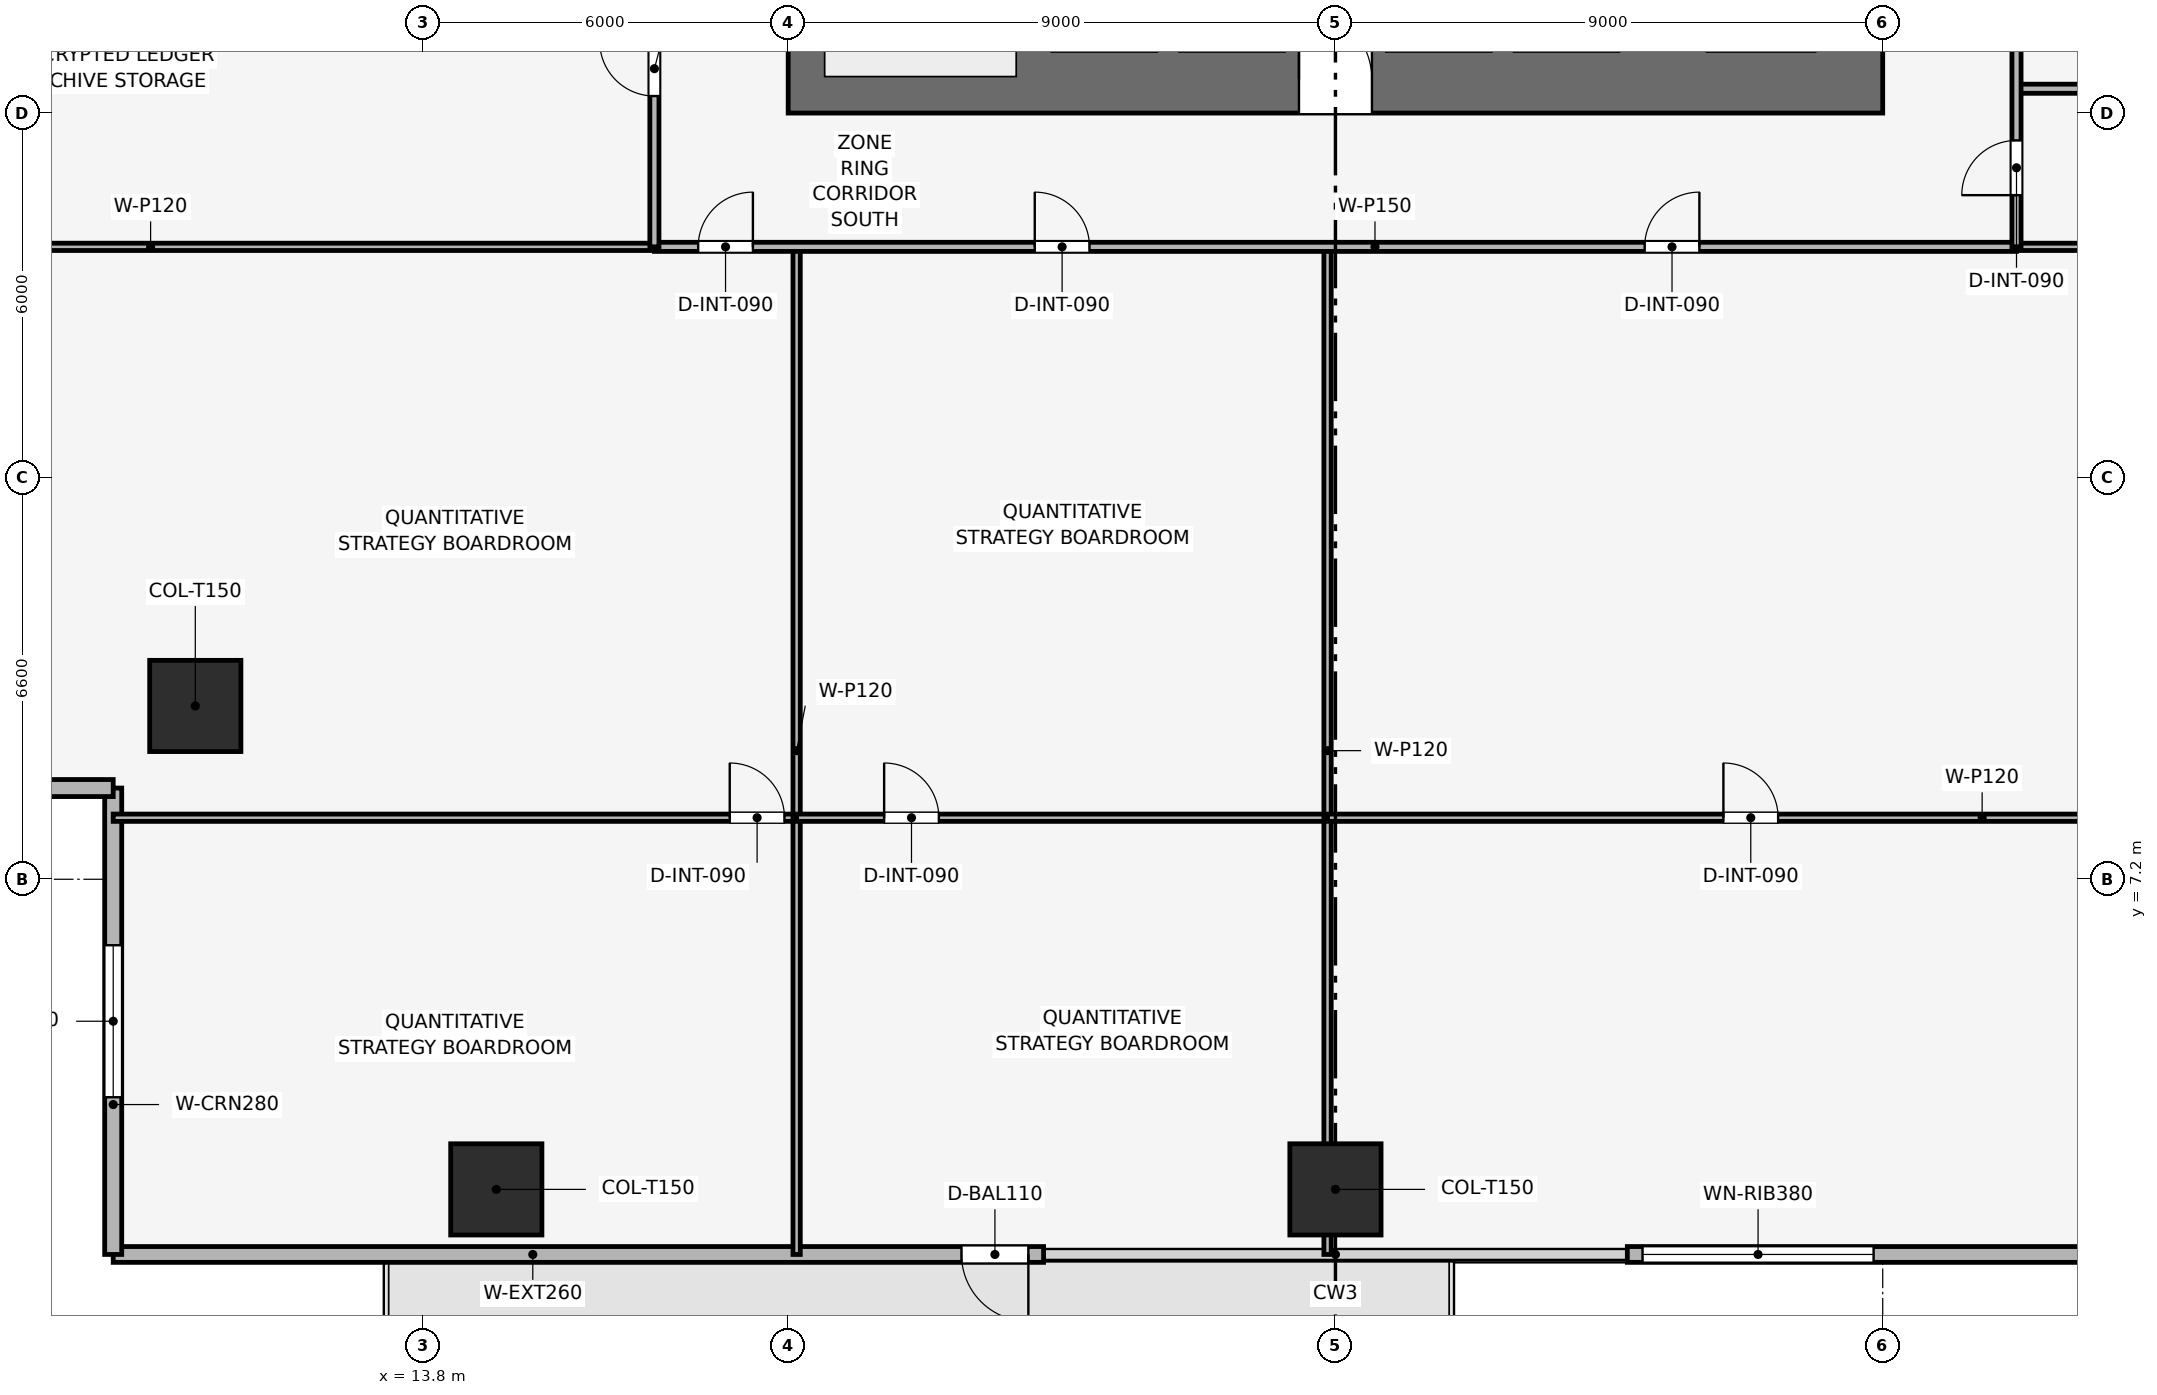
"""IFC4 building model, lengths in metres.
Left out: names, types, materials, properties, quantities, classifications, styles, units other than length and angle.
Written with IfcOpenShell. Run it as: python <this file> out.ifc"""

import sys

from ifc_helpers import new_model, si_unit, direction, frame, frame_2d, origin, origin_2d, place, context, subcontext, project, spatial, rectangle, extrude, element, fill, save


model = new_model("IFC4")
c1 = context("Model", 3, precision=1e-05, world=origin(), true_north=direction((0.0, 1.0)))
c2 = subcontext(c1, "Body", "Model", "MODEL_VIEW")
j1 = project(units=[si_unit("LENGTHUNIT", "METRE"), si_unit("PLANEANGLEUNIT", "RADIAN")], contexts=[c1])
p1 = place(None, origin())
s1 = spatial("IfcSite", under=j1, at=p1, CompositionType="ELEMENT")
p2 = place(p1, origin())
s2 = spatial("IfcBuilding", under=s1, at=p2, CompositionType="ELEMENT")
p3 = place(p2, frame((0.0, 0.0, 88.5)))
s3 = spatial("IfcBuildingStorey", under=s2, at=p3, CompositionType="ELEMENT", Elevation=88.5)
p4 = place(p3, frame((19.8, 20.35, 0.0), z_axis=(0.0, 0.0, 1.0), x_axis=(1.0, 0.0, 0.0)))
e1 = element("IfcWall", 1, at=p4, inside=s3, PredefinedType="SHEAR", context=c2, shape_type="SweptSolid", body=[
    extrude(rectangle(XDim=18.0, YDim=1.1, at=frame_2d((9.0, 0.0))), origin(), (0.0, 0.0, 1.0), 3.9),
])
p5 = place(p4, frame((8.4, 0.0, 0.0)))
e2 = element("IfcOpeningElement", 2, at=p5, cuts=e1, PredefinedType="OPENING", context=c2, shape_type="SweptSolid", body=[
    extrude(rectangle(XDim=1.2, YDim=2.2, at=frame_2d((0.6, 1.1))), frame((0.0, 0.56, 0.0), z_axis=(0.0, -1.0, 0.0), x_axis=(1.0, 0.0, 0.0)), (0.0, 0.0, 1.0), 1.12),
])
for number, where, z_axis, x_axis in (
    (3, (15.0, 2.1, 0.003), (0.0, 0.0, 1.0), (1.0, 0.0, 0.0)),
    (4, (28.8, 2.1, 0.003), (0.0, 0.0, 1.0), (1.0, 0.0, 0.0)),
    (5, (10.05, 10.05, 0.003), (0.0, 0.0, 1.0), (1.0, 0.0, 0.0)),
):
    element("IfcColumn", number, at=place(p3, frame(where, z_axis=z_axis, x_axis=x_axis)), inside=s3, PredefinedType="COLUMN", context=c2, shape_type="SweptSolid", body=[
        extrude(rectangle(XDim=1.5, YDim=1.5, at=origin_2d()), origin(), (0.0, 0.0, 1.0), 3.644),
    ])
p6 = place(p3, frame((48.9, 1.03, 0.0), z_axis=(0.0, 0.0, 1.0), x_axis=(-1.0, 0.0, 0.0)))
e6 = element("IfcWall", 6, at=p6, inside=s3, PredefinedType="SOLIDWALL", context=c2, shape_type="SweptSolid", body=[
    extrude(rectangle(XDim=15.3, YDim=0.26, at=frame_2d((7.65, 0.0))), origin(), (0.0, 0.0, 1.0), 3.65),
])
p7 = place(p6, frame((11.25, 0.0, 0.9)))
e7 = element("IfcOpeningElement", 7, at=p7, cuts=e6, PredefinedType="OPENING", context=c2, shape_type="SweptSolid", body=[
    extrude(rectangle(XDim=3.8, YDim=1.9, at=frame_2d((1.9, 0.95))), frame((0.0, 0.14, 0.0), z_axis=(0.0, -1.0, 0.0), x_axis=(1.0, 0.0, 0.0)), (0.0, 0.0, 1.0), 0.28),
])
p8 = place(p3, frame((24.0, 1.03, 0.0), z_axis=(0.0, 0.0, 1.0), x_axis=(-1.0, 0.0, 0.0)))
e8 = element("IfcWall", 8, at=p8, inside=s3, PredefinedType="SOLIDWALL", context=c2, shape_type="SweptSolid", body=[
    extrude(rectangle(XDim=15.3, YDim=0.26, at=frame_2d((7.65, 0.0))), origin(), (0.0, 0.0, 1.0), 3.65),
])
p9 = place(p8, frame((0.25, 0.0, 0.0)))
e9 = element("IfcOpeningElement", 9, at=p9, cuts=e8, PredefinedType="OPENING", context=c2, shape_type="SweptSolid", body=[
    extrude(rectangle(XDim=1.1, YDim=2.2, at=frame_2d((0.55, 1.1))), frame((0.0, 0.14, 0.0), z_axis=(0.0, -1.0, 0.0), x_axis=(1.0, 0.0, 0.0)), (0.0, 0.0, 1.0), 0.28),
])
p10 = place(p3, frame((8.7, 1.03, 0.0), z_axis=(0.0, 0.0, 1.0), x_axis=(0.0, 1.0, 0.0)))
e10 = element("IfcWall", 10, at=p10, inside=s3, PredefinedType="SOLIDWALL", context=c2, shape_type="SweptSolid", body=[
    extrude(rectangle(XDim=7.67, YDim=0.28, at=frame_2d((3.835, 0.0))), origin(), (0.0, 0.0, 1.0), 3.65),
])
p11 = place(p10, frame((2.585, 0.0, 0.9)))
e11 = element("IfcOpeningElement", 11, at=p11, cuts=e10, PredefinedType="OPENING", context=c2, shape_type="SweptSolid", body=[
    extrude(rectangle(XDim=2.5, YDim=1.9, at=frame_2d((1.25, 0.95))), frame((0.0, 0.15, 0.0), z_axis=(0.0, -1.0, 0.0), x_axis=(1.0, 0.0, 0.0)), (0.0, 0.0, 1.0), 0.3),
])
p12 = place(p3, frame((8.7, 8.7, 0.0), z_axis=(0.0, 0.0, 1.0), x_axis=(-1.0, 0.0, 0.0)))
e12 = element("IfcWall", 12, at=p12, inside=s3, PredefinedType="SOLIDWALL", context=c2, shape_type="SweptSolid", body=[
    extrude(rectangle(XDim=7.67, YDim=0.28, at=frame_2d((3.835, 0.0))), origin(), (0.0, 0.0, 1.0), 3.65),
])
p13 = place(p12, frame((2.585, 0.0, 0.9)))
e13 = element("IfcOpeningElement", 13, at=p13, cuts=e12, PredefinedType="OPENING", context=c2, shape_type="SweptSolid", body=[
    extrude(rectangle(XDim=2.5, YDim=1.9, at=frame_2d((1.25, 0.95))), frame((0.0, 0.15, 0.0), z_axis=(0.0, -1.0, 0.0), x_axis=(1.0, 0.0, 0.0)), (0.0, 0.0, 1.0), 0.3),
])
p14 = place(p3, frame((8.7, 8.212, 0.0), z_axis=(0.0, 0.0, 1.0), x_axis=(1.0, 0.0, 0.0)))
e14 = element("IfcWall", 14, at=p14, inside=s3, PredefinedType="PARTITIONING", context=c2, shape_type="SweptSolid", body=[
    extrude(rectangle(XDim=11.239, YDim=0.12, at=frame_2d((5.62, 0.0))), origin(), (0.0, 0.0, 1.0), 2.935),
])
p15 = place(p14, frame((10.139, 0.0, 0.0)))
e15 = element("IfcOpeningElement", 15, at=p15, cuts=e14, PredefinedType="OPENING", context=c2, shape_type="SweptSolid", body=[
    extrude(rectangle(XDim=0.9, YDim=2.1, at=frame_2d((0.45, 1.05))), frame((0.0, 0.07, 0.0), z_axis=(0.0, -1.0, 0.0), x_axis=(1.0, 0.0, 0.0)), (0.0, 0.0, 1.0), 0.14),
])
p16 = place(p3, frame((19.939, 1.03, 0.0), z_axis=(0.0, 0.0, 1.0), x_axis=(0.0, 1.0, 0.0)))
e16 = element("IfcWall", 16, at=p16, inside=s3, PredefinedType="PARTITIONING", context=c2, shape_type="SweptSolid", body=[
    extrude(rectangle(XDim=16.57, YDim=0.12, at=frame_2d((8.285, 0.0))), origin(), (0.0, 0.0, 1.0), 2.935),
])
p17 = place(p3, frame((19.939, 8.212, 0.0), z_axis=(0.0, 0.0, 1.0), x_axis=(1.0, 0.0, 0.0)))
e17 = element("IfcWall", 17, at=p17, inside=s3, PredefinedType="PARTITIONING", context=c2, shape_type="SweptSolid", body=[
    extrude(rectangle(XDim=8.731, YDim=0.12, at=frame_2d((4.365, 0.0))), origin(), (0.0, 0.0, 1.0), 3.085),
])
p18 = place(p17, frame((1.439, 0.0, 0.0)))
e18 = element("IfcOpeningElement", 18, at=p18, cuts=e17, PredefinedType="OPENING", context=c2, shape_type="SweptSolid", body=[
    extrude(rectangle(XDim=0.9, YDim=2.1, at=frame_2d((0.45, 1.05))), frame((0.0, 0.07, 0.0), z_axis=(0.0, -1.0, 0.0), x_axis=(1.0, 0.0, 0.0)), (0.0, 0.0, 1.0), 0.14),
])
p19 = place(p3, frame((28.67, 1.03, 0.0), z_axis=(0.0, 0.0, 1.0), x_axis=(0.0, 1.0, 0.0)))
e19 = element("IfcWall", 19, at=p19, inside=s3, PredefinedType="PARTITIONING", context=c2, shape_type="SweptSolid", body=[
    extrude(rectangle(XDim=16.57, YDim=0.12, at=frame_2d((8.285, 0.0))), origin(), (0.0, 0.0, 1.0), 3.085),
])
p20 = place(p3, frame((28.67, 8.212, 0.0), z_axis=(0.0, 0.0, 1.0), x_axis=(1.0, 0.0, 0.0)))
e20 = element("IfcWall", 20, at=p20, inside=s3, PredefinedType="PARTITIONING", context=c2, shape_type="SweptSolid", body=[
    extrude(rectangle(XDim=20.23, YDim=0.12, at=frame_2d((10.115, 0.0))), origin(), (0.0, 0.0, 1.0), 2.935),
])
p21 = place(p20, frame((6.51, 0.0, 0.0)))
e21 = element("IfcOpeningElement", 21, at=p21, cuts=e20, PredefinedType="OPENING", context=c2, shape_type="SweptSolid", body=[
    extrude(rectangle(XDim=0.9, YDim=2.1, at=frame_2d((0.45, 1.05))), frame((0.0, 0.07, 0.0), z_axis=(0.0, -1.0, 0.0), x_axis=(1.0, 0.0, 0.0)), (0.0, 0.0, 1.0), 0.14),
])
for number, where, z_axis, x_axis in (
    (22, (1.03, 17.6, 0.0), (0.0, 0.0, 1.0), (1.0, 0.0, 0.0)),
    (23, (40.0, 17.6, 0.0), (0.0, 0.0, 1.0), (1.0, 0.0, 0.0)),
):
    element("IfcWall", number, at=place(p3, frame(where, z_axis=z_axis, x_axis=x_axis)), inside=s3, PredefinedType="PARTITIONING", context=c2, shape_type="SweptSolid", body=[
        extrude(rectangle(XDim=16.57, YDim=0.12, at=frame_2d((8.285, 0.0))), origin(), (0.0, 0.0, 1.0), 2.935),
    ])
p22 = place(p3, frame((40.0, 20.2, 0.0), z_axis=(0.0, 0.0, 1.0), x_axis=(1.0, 0.0, 0.0)))
e24 = element("IfcWall", 24, at=p22, inside=s3, PredefinedType="PARTITIONING", context=c2, shape_type="SweptSolid", body=[
    extrude(rectangle(XDim=16.57, YDim=0.15, at=frame_2d((8.285, 0.0))), origin(), (0.0, 0.0, 1.0), 2.935),
])
p23 = place(p22, frame((9.435, 0.0, 0.0)))
e25 = element("IfcOpeningElement", 25, at=p23, cuts=e24, PredefinedType="OPENING", context=c2, shape_type="SweptSolid", body=[
    extrude(rectangle(XDim=0.9, YDim=2.1, at=frame_2d((0.45, 1.05))), frame((0.0, 0.085, 0.0), z_axis=(0.0, -1.0, 0.0), x_axis=(1.0, 0.0, 0.0)), (0.0, 0.0, 1.0), 0.17),
])
p24 = place(p3, frame((17.6, 17.6, 0.0), z_axis=(0.0, 0.0, 1.0), x_axis=(1.0, 0.0, 0.0)))
e26 = element("IfcWall", 26, at=p24, inside=s3, PredefinedType="PARTITIONING", context=c2, shape_type="SweptSolid", body=[
    extrude(rectangle(XDim=22.4, YDim=0.15, at=frame_2d((11.2, 0.0))), origin(), (0.0, 0.0, 1.0), 3.085),
])
p25 = place(p24, frame((0.72, 0.0, 0.0)))
e27 = element("IfcOpeningElement", 27, at=p25, cuts=e26, PredefinedType="OPENING", context=c2, shape_type="SweptSolid", body=[
    extrude(rectangle(XDim=0.9, YDim=2.1, at=frame_2d((0.45, 1.05))), frame((0.0, 0.085, 0.0), z_axis=(0.0, -1.0, 0.0), x_axis=(1.0, 0.0, 0.0)), (0.0, 0.0, 1.0), 0.17),
])
p26 = place(p24, frame((6.255, 0.0, 0.0)))
e28 = element("IfcOpeningElement", 28, at=p26, cuts=e26, PredefinedType="OPENING", context=c2, shape_type="SweptSolid", body=[
    extrude(rectangle(XDim=0.9, YDim=2.1, at=frame_2d((0.45, 1.05))), frame((0.0, 0.085, 0.0), z_axis=(0.0, -1.0, 0.0), x_axis=(1.0, 0.0, 0.0)), (0.0, 0.0, 1.0), 0.17),
])
p27 = place(p24, frame((16.285, 0.0, 0.0)))
e29 = element("IfcOpeningElement", 29, at=p27, cuts=e26, PredefinedType="OPENING", context=c2, shape_type="SweptSolid", body=[
    extrude(rectangle(XDim=0.9, YDim=2.1, at=frame_2d((0.45, 1.05))), frame((0.0, 0.085, 0.0), z_axis=(0.0, -1.0, 0.0), x_axis=(1.0, 0.0, 0.0)), (0.0, 0.0, 1.0), 0.17),
])
p28 = place(p3, frame((17.6, 17.6, 0.0), z_axis=(0.0, 0.0, 1.0), x_axis=(0.0, 1.0, 0.0)))
e30 = element("IfcWall", 30, at=p28, inside=s3, PredefinedType="PARTITIONING", context=c2, shape_type="SweptSolid", body=[
    extrude(rectangle(XDim=22.4, YDim=0.15, at=frame_2d((11.2, 0.0))), origin(), (0.0, 0.0, 1.0), 3.085),
])
p29 = place(p28, frame((2.48, 0.0, 0.0)))
e31 = element("IfcOpeningElement", 31, at=p29, cuts=e30, PredefinedType="OPENING", context=c2, shape_type="SweptSolid", body=[
    extrude(rectangle(XDim=0.9, YDim=2.1, at=frame_2d((0.45, 1.05))), frame((0.0, 0.085, 0.0), z_axis=(0.0, -1.0, 0.0), x_axis=(1.0, 0.0, 0.0)), (0.0, 0.0, 1.0), 0.17),
])
p30 = place(p28, frame((13.68, 0.0, 0.0)))
e32 = element("IfcOpeningElement", 32, at=p30, cuts=e30, PredefinedType="OPENING", context=c2, shape_type="SweptSolid", body=[
    extrude(rectangle(XDim=0.9, YDim=2.1, at=frame_2d((0.45, 1.05))), frame((0.0, 0.085, 0.0), z_axis=(0.0, -1.0, 0.0), x_axis=(1.0, 0.0, 0.0)), (0.0, 0.0, 1.0), 0.17),
])
p31 = place(p3, frame((40.0, 17.6, 0.0), z_axis=(0.0, 0.0, 1.0), x_axis=(0.0, 1.0, 0.0)))
e33 = element("IfcWall", 33, at=p31, inside=s3, PredefinedType="PARTITIONING", context=c2, shape_type="SweptSolid", body=[
    extrude(rectangle(XDim=22.4, YDim=0.15, at=frame_2d((11.2, 0.0))), origin(), (0.0, 0.0, 1.0), 3.085),
])
p32 = place(p31, frame((0.85, 0.0, 0.0)))
e34 = element("IfcOpeningElement", 34, at=p32, cuts=e33, PredefinedType="OPENING", context=c2, shape_type="SweptSolid", body=[
    extrude(rectangle(XDim=0.9, YDim=2.1, at=frame_2d((0.45, 1.05))), frame((0.0, 0.085, 0.0), z_axis=(0.0, -1.0, 0.0), x_axis=(1.0, 0.0, 0.0)), (0.0, 0.0, 1.0), 0.17),
])
p33 = place(p31, frame((3.55, 0.0, 0.0)))
e35 = element("IfcOpeningElement", 35, at=p33, cuts=e33, PredefinedType="OPENING", context=c2, shape_type="SweptSolid", body=[
    extrude(rectangle(XDim=0.9, YDim=2.1, at=frame_2d((0.45, 1.05))), frame((0.0, 0.085, 0.0), z_axis=(0.0, -1.0, 0.0), x_axis=(1.0, 0.0, 0.0)), (0.0, 0.0, 1.0), 0.17),
])
p34 = place(p31, frame((6.45, 0.0, 0.0)))
e36 = element("IfcOpeningElement", 36, at=p34, cuts=e33, PredefinedType="OPENING", context=c2, shape_type="SweptSolid", body=[
    extrude(rectangle(XDim=0.9, YDim=2.1, at=frame_2d((0.45, 1.05))), frame((0.0, 0.085, 0.0), z_axis=(0.0, -1.0, 0.0), x_axis=(1.0, 0.0, 0.0)), (0.0, 0.0, 1.0), 0.17),
])
p35 = place(p31, frame((9.2, 0.0, 0.0)))
e37 = element("IfcOpeningElement", 37, at=p35, cuts=e33, PredefinedType="OPENING", context=c2, shape_type="SweptSolid", body=[
    extrude(rectangle(XDim=0.95, YDim=2.1, at=frame_2d((0.475, 1.05))), frame((0.0, 0.085, 0.0), z_axis=(0.0, -1.0, 0.0), x_axis=(1.0, 0.0, 0.0)), (0.0, 0.0, 1.0), 0.17),
])
p36 = place(p31, frame((16.25, 0.0, 0.0)))
e38 = element("IfcOpeningElement", 38, at=p36, cuts=e33, PredefinedType="OPENING", context=c2, shape_type="SweptSolid", body=[
    extrude(rectangle(XDim=0.9, YDim=2.1, at=frame_2d((0.45, 1.05))), frame((0.0, 0.085, 0.0), z_axis=(0.0, -1.0, 0.0), x_axis=(1.0, 0.0, 0.0)), (0.0, 0.0, 1.0), 0.17),
])
p37 = place(p9, origin())
e39 = element("IfcDoor", 39, at=p37, inside=s3, OperationType="SINGLE_SWING_LEFT", PredefinedType="DOOR", context=c2, shape_type="SweptSolid", body=[
    extrude(rectangle(XDim=1.1, YDim=2.2, at=frame_2d((0.55, 1.1))), frame((0.0, 0.025, 0.0), z_axis=(0.0, -1.0, 0.0), x_axis=(1.0, 0.0, 0.0)), (0.0, 0.0, 1.0), 0.05),
])
fill(e9, e39)
p38 = place(p7, origin())
e40 = element("IfcWindow", 40, at=p38, inside=s3, PartitioningType="SINGLE_PANEL", PredefinedType="WINDOW", context=c2, shape_type="SweptSolid", body=[
    extrude(rectangle(XDim=3.8, YDim=1.9, at=frame_2d((1.9, 0.95))), frame((0.0, 0.03, 0.0), z_axis=(0.0, -1.0, 0.0), x_axis=(1.0, 0.0, 0.0)), (0.0, 0.0, 1.0), 0.06),
])
fill(e7, e40)
p39 = place(p11, origin())
e41 = element("IfcWindow", 41, at=p39, inside=s3, PartitioningType="SINGLE_PANEL", PredefinedType="WINDOW", context=c2, shape_type="SweptSolid", body=[
    extrude(rectangle(XDim=2.5, YDim=1.9, at=frame_2d((1.25, 0.95))), frame((0.0, 0.03, 0.0), z_axis=(0.0, -1.0, 0.0), x_axis=(1.0, 0.0, 0.0)), (0.0, 0.0, 1.0), 0.06),
])
fill(e11, e41)
p40 = place(p15, origin())
e42 = element("IfcDoor", 42, at=p40, inside=s3, OperationType="SINGLE_SWING_LEFT", PredefinedType="DOOR", context=c2, shape_type="SweptSolid", body=[
    extrude(rectangle(XDim=0.9, YDim=2.1, at=frame_2d((0.45, 1.05))), frame((0.0, 0.025, 0.0), z_axis=(0.0, -1.0, 0.0), x_axis=(1.0, 0.0, 0.0)), (0.0, 0.0, 1.0), 0.05),
])
fill(e15, e42)
p41 = place(p18, origin())
e43 = element("IfcDoor", 43, at=p41, inside=s3, OperationType="SINGLE_SWING_LEFT", PredefinedType="DOOR", context=c2, shape_type="SweptSolid", body=[
    extrude(rectangle(XDim=0.9, YDim=2.1, at=frame_2d((0.45, 1.05))), frame((0.0, 0.025, 0.0), z_axis=(0.0, -1.0, 0.0), x_axis=(1.0, 0.0, 0.0)), (0.0, 0.0, 1.0), 0.05),
])
fill(e18, e43)
p42 = place(p21, origin())
e44 = element("IfcDoor", 44, at=p42, inside=s3, OperationType="SINGLE_SWING_LEFT", PredefinedType="DOOR", context=c2, shape_type="SweptSolid", body=[
    extrude(rectangle(XDim=0.9, YDim=2.1, at=frame_2d((0.45, 1.05))), frame((0.0, 0.025, 0.0), z_axis=(0.0, -1.0, 0.0), x_axis=(1.0, 0.0, 0.0)), (0.0, 0.0, 1.0), 0.05),
])
fill(e21, e44)
p43 = place(p25, origin())
e45 = element("IfcDoor", 45, at=p43, inside=s3, OperationType="SINGLE_SWING_RIGHT", PredefinedType="DOOR", context=c2, shape_type="SweptSolid", body=[
    extrude(rectangle(XDim=0.9, YDim=2.1, at=frame_2d((0.45, 1.05))), frame((0.0, 0.025, 0.0), z_axis=(0.0, -1.0, 0.0), x_axis=(1.0, 0.0, 0.0)), (0.0, 0.0, 1.0), 0.05),
])
fill(e27, e45)
p44 = place(p26, origin())
e46 = element("IfcDoor", 46, at=p44, inside=s3, OperationType="SINGLE_SWING_LEFT", PredefinedType="DOOR", context=c2, shape_type="SweptSolid", body=[
    extrude(rectangle(XDim=0.9, YDim=2.1, at=frame_2d((0.45, 1.05))), frame((0.0, 0.025, 0.0), z_axis=(0.0, -1.0, 0.0), x_axis=(1.0, 0.0, 0.0)), (0.0, 0.0, 1.0), 0.05),
])
fill(e28, e46)
p45 = place(p27, origin())
e47 = element("IfcDoor", 47, at=p45, inside=s3, OperationType="SINGLE_SWING_RIGHT", PredefinedType="DOOR", context=c2, shape_type="SweptSolid", body=[
    extrude(rectangle(XDim=0.9, YDim=2.1, at=frame_2d((0.45, 1.05))), frame((0.0, 0.025, 0.0), z_axis=(0.0, -1.0, 0.0), x_axis=(1.0, 0.0, 0.0)), (0.0, 0.0, 1.0), 0.05),
])
fill(e29, e47)
p46 = place(p29, origin())
e48 = element("IfcDoor", 48, at=p46, inside=s3, OperationType="SINGLE_SWING_RIGHT", PredefinedType="DOOR", context=c2, shape_type="SweptSolid", body=[
    extrude(rectangle(XDim=0.9, YDim=2.1, at=frame_2d((0.45, 1.05))), frame((0.0, 0.025, 0.0), z_axis=(0.0, -1.0, 0.0), x_axis=(1.0, 0.0, 0.0)), (0.0, 0.0, 1.0), 0.05),
])
fill(e31, e48)
p47 = place(p32, origin())
e49 = element("IfcDoor", 49, at=p47, inside=s3, OperationType="SINGLE_SWING_LEFT", PredefinedType="DOOR", context=c2, shape_type="SweptSolid", body=[
    extrude(rectangle(XDim=0.9, YDim=2.1, at=frame_2d((0.45, 1.05))), frame((0.0, 0.025, 0.0), z_axis=(0.0, -1.0, 0.0), x_axis=(1.0, 0.0, 0.0)), (0.0, 0.0, 1.0), 0.05),
])
fill(e34, e49)
p48 = place(p5, origin())
e50 = element("IfcDoor", 50, at=p48, inside=s3, OperationType="SINGLE_SWING_LEFT", PredefinedType="DOOR", context=c2, shape_type="SweptSolid", body=[
    extrude(rectangle(XDim=1.2, YDim=2.2, at=frame_2d((0.6, 1.1))), frame((0.0, 0.025, 0.0), z_axis=(0.0, -1.0, 0.0), x_axis=(1.0, 0.0, 0.0)), (0.0, 0.0, 1.0), 0.05),
])
fill(e2, e50)
save(model, sys.argv[1])
